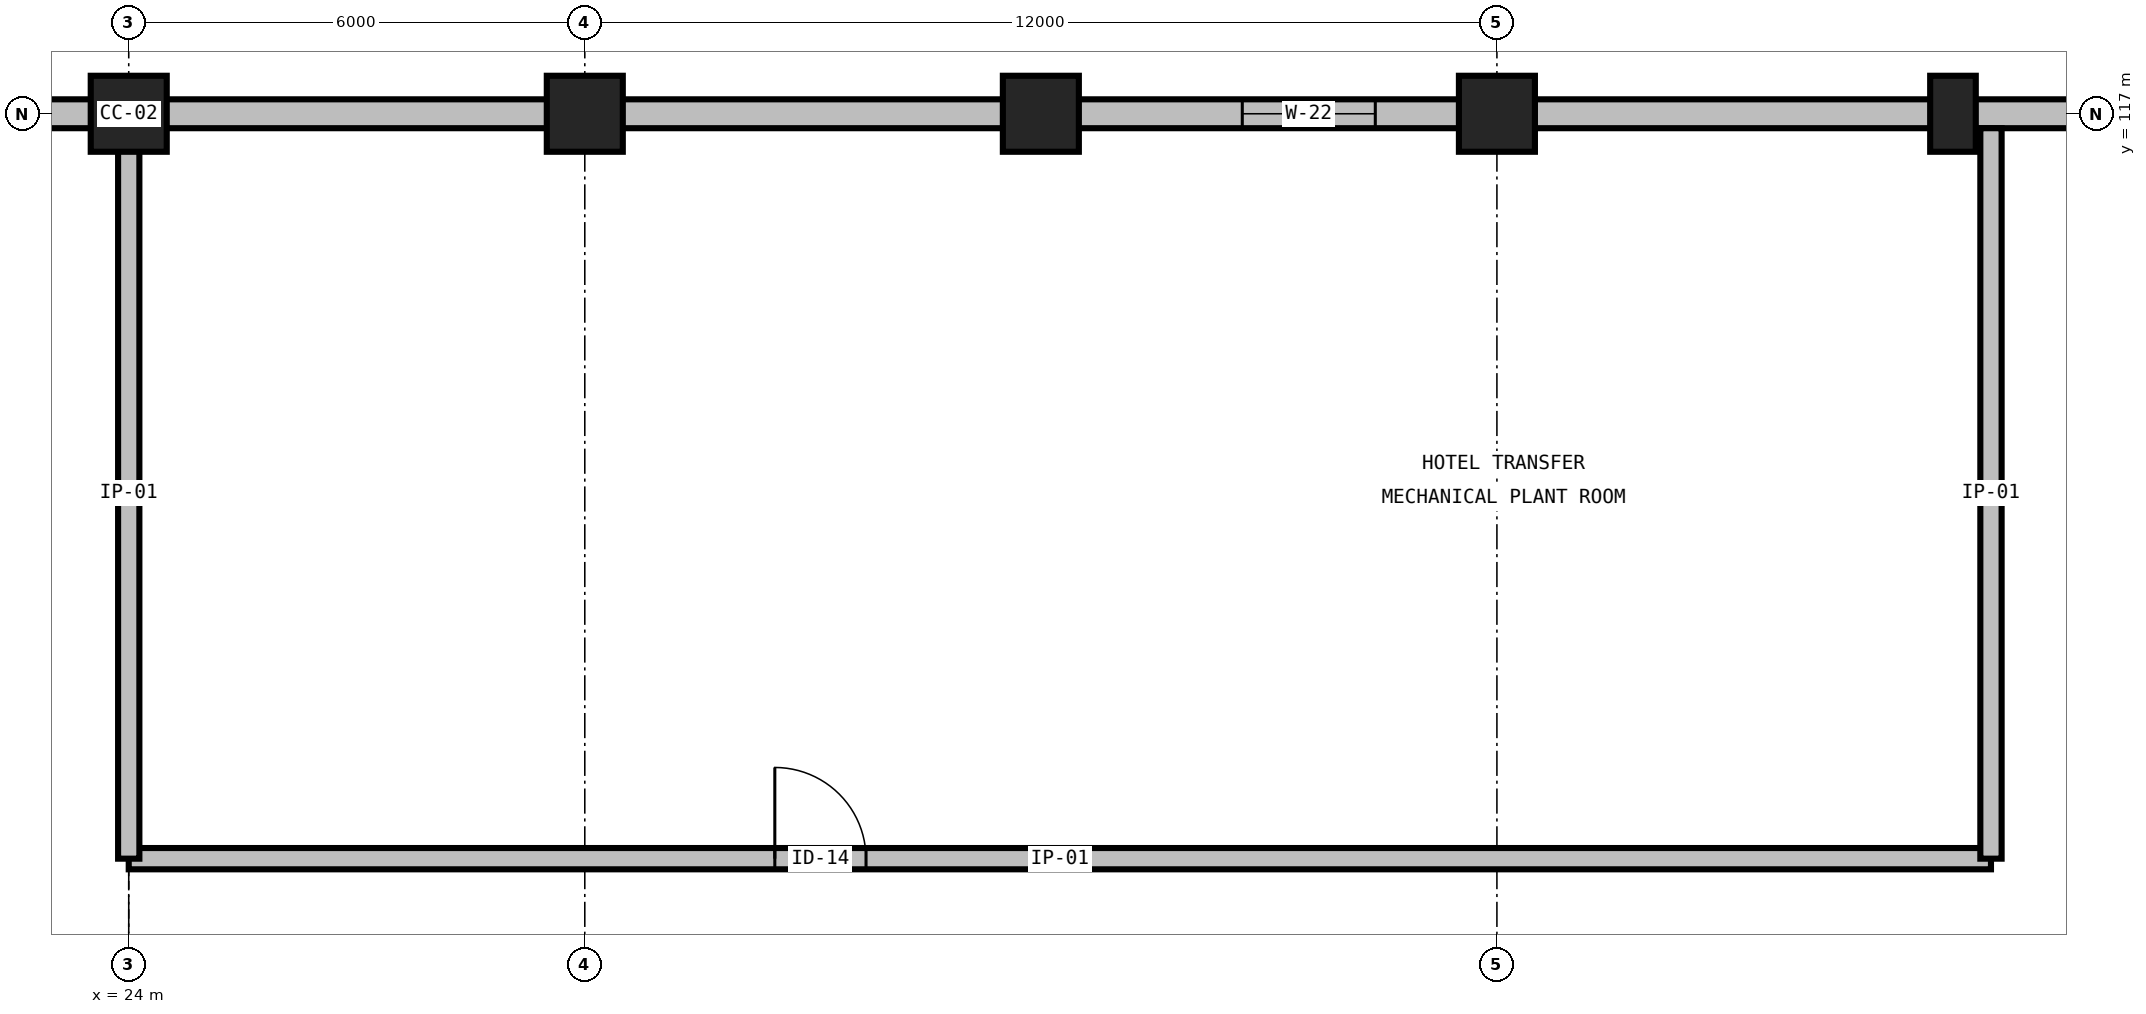
"""IFC4 building model, lengths in metres.
Left out: names, types, materials, properties, quantities, classifications, styles, units other than length and angle.
Written with IfcOpenShell. Run it as: python <this file> out.ifc"""

import sys

from ifc_helpers import new_model, si_unit, direction, frame, frame_2d, origin, origin_2d, place, context, subcontext, project, spatial, rectangle, extrude, element, fill, save


model = new_model("IFC4")
c1 = context("Model", 3, precision=1e-05, world=origin(), true_north=direction((0.0, 1.0)))
c2 = subcontext(c1, "Body", "Model", "MODEL_VIEW")
j1 = project(units=[si_unit("LENGTHUNIT", "METRE"), si_unit("PLANEANGLEUNIT", "RADIAN")], contexts=[c1])
p1 = place(None, origin())
s1 = spatial("IfcSite", under=j1, at=p1, CompositionType="ELEMENT")
p2 = place(p1, origin())
s2 = spatial("IfcBuilding", under=s1, at=p2, CompositionType="ELEMENT")
p3 = place(p2, frame((0.0, 0.0, 23.4)))
s3 = spatial("IfcBuildingStorey", under=s2, at=p3, CompositionType="ELEMENT", Elevation=23.4)
for number, where, z_axis, x_axis in (
    (1, (24.0, 117.0, 0.0), (0.0, 0.0, 1.0), (1.0, 0.0, 0.0)),
    (2, (30.0, 117.0, 0.0), (0.0, 0.0, 1.0), (1.0, 0.0, 0.0)),
    (3, (36.0, 117.0, 0.0), (0.0, 0.0, 1.0), (1.0, 0.0, 0.0)),
    (4, (42.0, 117.0, 0.0), (0.0, 0.0, 1.0), (1.0, 0.0, 0.0)),
):
    element("IfcColumn", number, at=place(p3, frame(where, z_axis=z_axis, x_axis=x_axis)), inside=s3, PredefinedType="COLUMN", context=c2, shape_type="SweptSolid", body=[
        extrude(rectangle(XDim=1.0, YDim=1.0, at=origin_2d()), origin(), (0.0, 0.0, 1.0), 4.2),
    ])
p4 = place(p3, frame((48.0, 117.0, 0.0), z_axis=(0.0, 0.0, 1.0), x_axis=(1.0, 0.0, 0.0)))
e5 = element("IfcColumn", 5, at=p4, inside=s3, PredefinedType="PILASTER", context=c2, shape_type="SweptSolid", body=[
    extrude(rectangle(XDim=0.6, YDim=1.0, at=origin_2d()), origin(), (0.0, 0.0, 1.0), 4.2),
])
p5 = place(p3, frame((24.0, 117.0, 0.0), z_axis=(0.0, 0.0, 1.0), x_axis=(-1.0, 0.0, 0.0)))
e6 = element("IfcWall", 6, at=p5, inside=s3, PredefinedType="STANDARD", context=c2, shape_type="SweptSolid", body=[
    extrude(rectangle(XDim=12.0, YDim=0.38, at=frame_2d((6.0, 0.0))), origin(), (0.0, 0.0, 1.0), 2.626),
])
p6 = place(p5, frame((1.6, 0.0, 0.9)))
e7 = element("IfcOpeningElement", 7, at=p6, cuts=e6, PredefinedType="OPENING", context=c2, shape_type="SweptSolid", body=[
    extrude(rectangle(XDim=1.75, YDim=1.51, at=frame_2d((0.875, 0.755))), frame((0.0, 0.205, 0.0), z_axis=(0.0, -1.0, 0.0), x_axis=(1.0, 0.0, 0.0)), (0.0, 0.0, 1.0), 0.41),
])
p7 = place(p3, frame((30.0, 117.0, 0.0), z_axis=(0.0, 0.0, 1.0), x_axis=(-1.0, 0.0, 0.0)))
e8 = element("IfcWall", 8, at=p7, inside=s3, PredefinedType="STANDARD", context=c2, shape_type="SweptSolid", body=[
    extrude(rectangle(XDim=6.0, YDim=0.38, at=frame_2d((3.0, 0.0))), origin(), (0.0, 0.0, 1.0), 2.986),
])
p8 = place(p3, frame((42.0, 117.0, 0.0), z_axis=(0.0, 0.0, 1.0), x_axis=(-1.0, 0.0, 0.0)))
e9 = element("IfcWall", 9, at=p8, inside=s3, PredefinedType="STANDARD", context=c2, shape_type="SweptSolid", body=[
    extrude(rectangle(XDim=12.0, YDim=0.38, at=frame_2d((6.0, 0.0))), origin(), (0.0, 0.0, 1.0), 2.986),
])
p9 = place(p8, frame((1.6, 0.0, 0.9)))
e10 = element("IfcOpeningElement", 10, at=p9, cuts=e9, PredefinedType="OPENING", context=c2, shape_type="SweptSolid", body=[
    extrude(rectangle(XDim=1.75, YDim=1.75, at=frame_2d((0.875, 0.875))), frame((0.0, 0.205, 0.0), z_axis=(0.0, -1.0, 0.0), x_axis=(1.0, 0.0, 0.0)), (0.0, 0.0, 1.0), 0.41),
])
p10 = place(p3, frame((54.0, 117.0, 0.0), z_axis=(0.0, 0.0, 1.0), x_axis=(-1.0, 0.0, 0.0)))
e11 = element("IfcWall", 11, at=p10, inside=s3, PredefinedType="STANDARD", context=c2, shape_type="SweptSolid", body=[
    extrude(rectangle(XDim=12.0, YDim=0.38, at=frame_2d((6.0, 0.0))), origin(), (0.0, 0.0, 1.0), 2.986),
])
p11 = place(p3, frame((24.0, 116.86, 3.85), z_axis=(0.0, 0.0, 1.0), x_axis=(-1.0, 0.0, 0.0)))
e12 = element("IfcWall", 12, at=p11, inside=s3, PredefinedType="PARAPET", context=c2, shape_type="SweptSolid", body=[
    extrude(rectangle(XDim=24.0, YDim=0.28, at=frame_2d((12.0, 0.0))), origin(), (0.0, 0.0, 1.0), 1.2),
])
p12 = place(p3, frame((24.0, 107.2, 0.0), z_axis=(0.0, 0.0, 1.0), x_axis=(1.0, 0.0, 0.0)))
e13 = element("IfcWall", 13, at=p12, inside=s3, PredefinedType="PARTITIONING", context=c2, shape_type="SweptSolid", body=[
    extrude(rectangle(XDim=24.5, YDim=0.28, at=frame_2d((12.25, 0.0))), origin(), (0.0, 0.0, 1.0), 3.89),
])
p13 = place(p12, frame((8.5, 0.0, 0.0)))
e14 = element("IfcOpeningElement", 14, at=p13, cuts=e13, PredefinedType="OPENING", context=c2, shape_type="SweptSolid", body=[
    extrude(rectangle(XDim=1.2, YDim=2.2, at=frame_2d((0.6, 1.1))), frame((0.0, 0.155, 0.0), z_axis=(0.0, -1.0, 0.0), x_axis=(1.0, 0.0, 0.0)), (0.0, 0.0, 1.0), 0.31),
])
p14 = place(p3, frame((48.5, 107.2, 0.0), z_axis=(0.0, 0.0, 1.0), x_axis=(0.0, 1.0, 0.0)))
e15 = element("IfcWall", 15, at=p14, inside=s3, PredefinedType="PARTITIONING", context=c2, shape_type="SweptSolid", body=[
    extrude(rectangle(XDim=9.61, YDim=0.28, at=frame_2d((4.805, 0.0))), origin(), (0.0, 0.0, 1.0), 3.89),
])
p15 = place(p3, frame((24.0, 116.81, 0.0), z_axis=(0.0, 0.0, 1.0), x_axis=(0.0, -1.0, 0.0)))
e16 = element("IfcWall", 16, at=p15, inside=s3, PredefinedType="PARTITIONING", context=c2, shape_type="SweptSolid", body=[
    extrude(rectangle(XDim=9.61, YDim=0.28, at=frame_2d((4.805, 0.0))), origin(), (0.0, 0.0, 1.0), 2.68),
])
p16 = place(p9, origin())
e17 = element("IfcWindow", 17, at=p16, inside=s3, PartitioningType="SINGLE_PANEL", PredefinedType="WINDOW", context=c2, shape_type="SweptSolid", body=[
    extrude(rectangle(XDim=1.75, YDim=1.75, at=frame_2d((0.875, 0.875))), frame((0.0, 0.03, 0.0), z_axis=(0.0, -1.0, 0.0), x_axis=(1.0, 0.0, 0.0)), (0.0, 0.0, 1.0), 0.06),
])
fill(e10, e17)
p17 = place(p13, origin())
e18 = element("IfcDoor", 18, at=p17, inside=s3, OperationType="SINGLE_SWING_LEFT", PredefinedType="DOOR", context=c2, shape_type="SweptSolid", body=[
    extrude(rectangle(XDim=1.2, YDim=2.2, at=frame_2d((0.6, 1.1))), frame((0.0, 0.025, 0.0), z_axis=(0.0, -1.0, 0.0), x_axis=(1.0, 0.0, 0.0)), (0.0, 0.0, 1.0), 0.05),
])
fill(e14, e18)
save(model, sys.argv[1])
